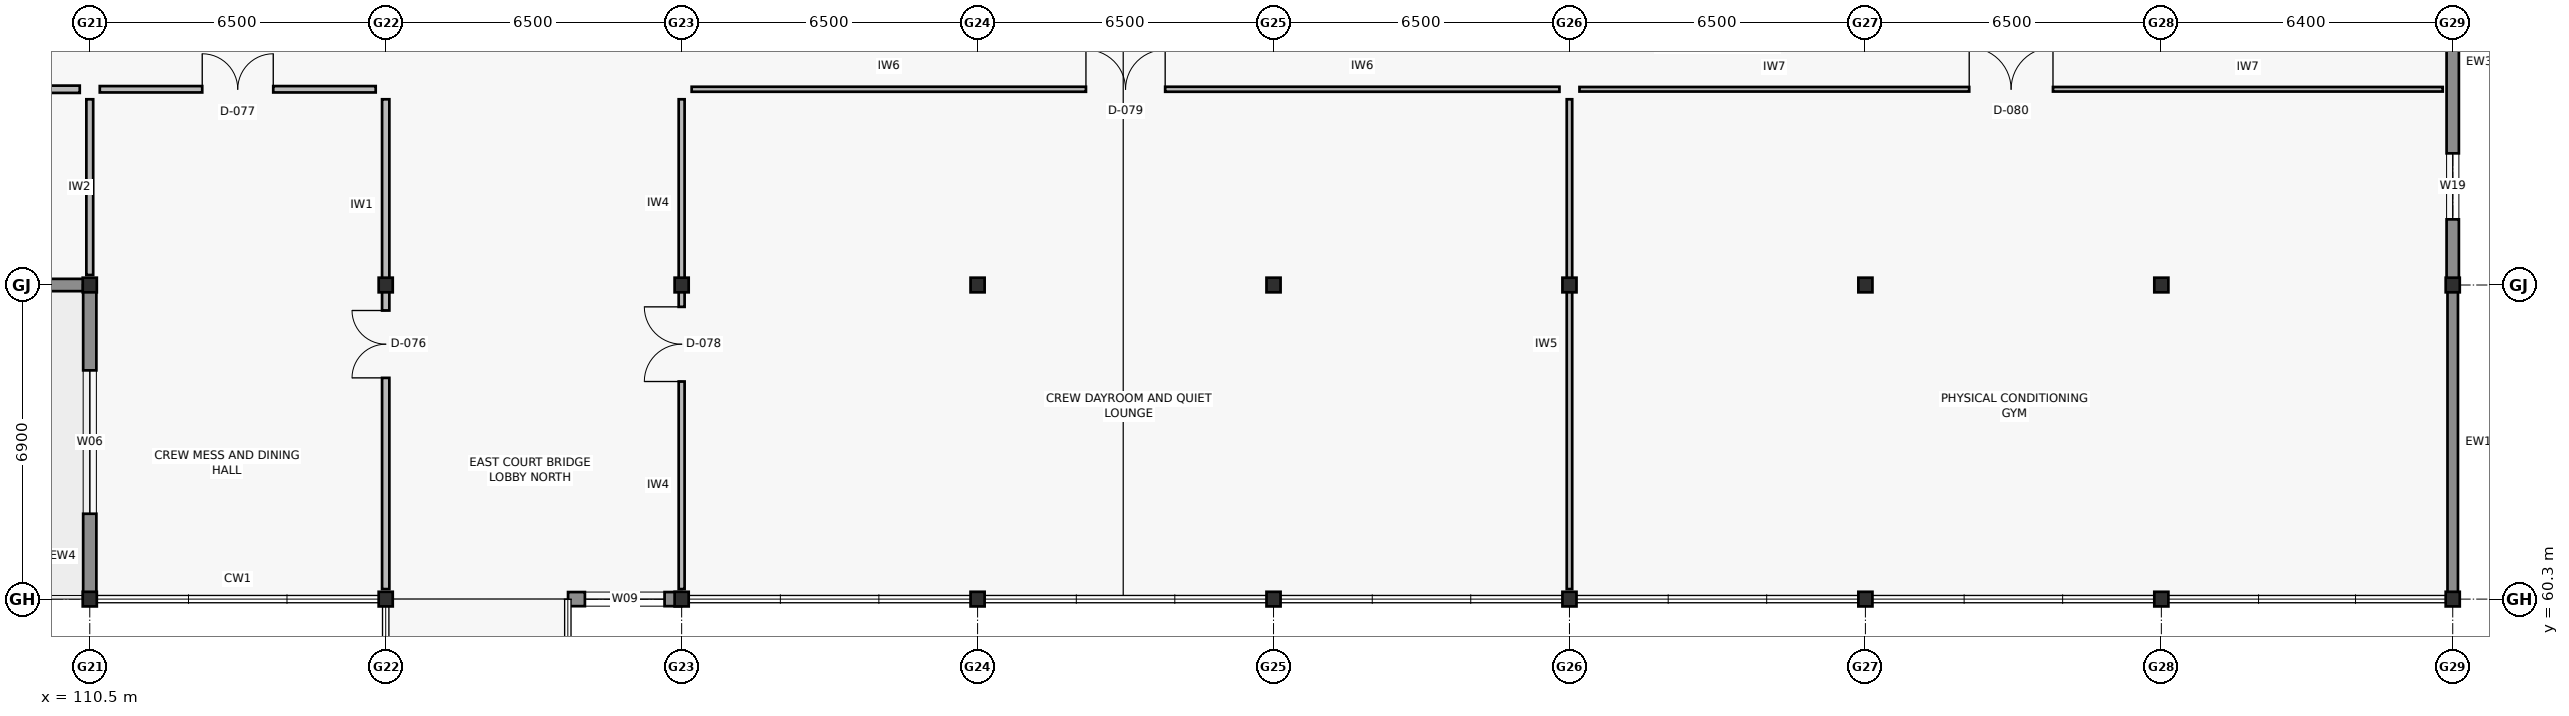
"""IFC4 building model, lengths in metres.
Left out: names, types, materials, properties, quantities, classifications, styles, units other than length and angle.
Written with IfcOpenShell. Run it as: python <this file> out.ifc"""

import sys

from ifc_helpers import new_model, si_unit, direction, frame, frame_2d, origin, origin_2d, place, context, subcontext, project, spatial, rectangle, i_section, extrude, element, fill, save


model = new_model("IFC4")
c1 = context("Model", 3, precision=1e-05, world=origin(), true_north=direction((0.0, 1.0)))
c2 = subcontext(c1, "Body", "Model", "MODEL_VIEW")
j1 = project(units=[si_unit("LENGTHUNIT", "METRE"), si_unit("PLANEANGLEUNIT", "RADIAN")], contexts=[c1])
p1 = place(None, origin())
s1 = spatial("IfcSite", under=j1, at=p1, CompositionType="ELEMENT")
p2 = place(p1, origin())
s2 = spatial("IfcBuilding", under=s1, at=p2, CompositionType="ELEMENT")
p3 = place(p2, frame((0.0, 0.0, 5.4)))
s3 = spatial("IfcBuildingStorey", under=s2, at=p3, CompositionType="ELEMENT", Elevation=5.4)
for number, where, z_axis, x_axis in (
    (1, (110.5, 60.3, 0.0), (0.0, 0.0, 1.0), (1.0, 0.0, 0.0)),
    (2, (110.5, 67.2, 0.0), (0.0, 0.0, 1.0), (1.0, 0.0, 0.0)),
    (3, (117.0, 60.3, 0.0), (0.0, 0.0, 1.0), (1.0, 0.0, 0.0)),
    (4, (117.0, 67.2, 0.0), (0.0, 0.0, 1.0), (1.0, 0.0, 0.0)),
    (5, (123.5, 60.3, 0.0), (0.0, 0.0, 1.0), (1.0, 0.0, 0.0)),
    (6, (123.5, 67.2, 0.0), (0.0, 0.0, 1.0), (1.0, 0.0, 0.0)),
    (7, (130.0, 60.3, 0.0), (0.0, 0.0, 1.0), (1.0, 0.0, 0.0)),
    (8, (130.0, 67.2, 0.0), (0.0, 0.0, 1.0), (1.0, 0.0, 0.0)),
    (9, (136.5, 60.3, 0.0), (0.0, 0.0, 1.0), (1.0, 0.0, 0.0)),
    (10, (136.5, 67.2, 0.0), (0.0, 0.0, 1.0), (1.0, 0.0, 0.0)),
    (11, (143.0, 60.3, 0.0), (0.0, 0.0, 1.0), (1.0, 0.0, 0.0)),
    (12, (143.0, 67.2, 0.0), (0.0, 0.0, 1.0), (1.0, 0.0, 0.0)),
    (13, (149.5, 60.3, 0.0), (0.0, 0.0, 1.0), (1.0, 0.0, 0.0)),
    (14, (149.5, 67.2, 0.0), (0.0, 0.0, 1.0), (1.0, 0.0, 0.0)),
    (15, (156.0, 60.3, 0.0), (0.0, 0.0, 1.0), (1.0, 0.0, 0.0)),
    (16, (156.0, 67.2, 0.0), (0.0, 0.0, 1.0), (1.0, 0.0, 0.0)),
    (17, (162.4, 60.3, 0.0), (0.0, 0.0, 1.0), (1.0, 0.0, 0.0)),
    (18, (162.4, 67.2, 0.0), (0.0, 0.0, 1.0), (1.0, 0.0, 0.0)),
):
    element("IfcColumn", number, at=place(p3, frame(where, z_axis=z_axis, x_axis=x_axis)), inside=s3, PredefinedType="COLUMN", context=c2, shape_type="SweptSolid", body=[
        extrude(i_section(OverallWidth=0.309, OverallDepth=0.321, WebThickness=0.014, FlangeThickness=0.022, FilletRadius=0.017, at=origin_2d()), origin(), (0.0, 0.0, 1.0), 4.2),
    ])
p4 = place(p3, frame((110.495, 67.2, 0.0), z_axis=(0.0, 0.0, 1.0), x_axis=(-1.0, 0.0, 0.0)))
e19 = element("IfcWall", 19, at=p4, inside=s3, PredefinedType="SOLIDWALL", context=c2, shape_type="SweptSolid", body=[
    extrude(rectangle(XDim=6.49, YDim=0.27, at=frame_2d((3.245, 0.0))), origin(), (0.0, 0.0, 1.0), 3.32),
])
p5 = place(p4, frame((2.675, 0.0, 0.0)))
e20 = element("IfcOpeningElement", 20, at=p5, cuts=e19, PredefinedType="OPENING", context=c2, shape_type="SweptSolid", body=[
    extrude(rectangle(XDim=1.14, YDim=2.14, at=frame_2d((0.57, 1.07))), frame((0.0, 0.145, 0.0), z_axis=(0.0, -1.0, 0.0), x_axis=(1.0, 0.0, 0.0)), (0.0, 0.0, 1.0), 0.29),
])
p6 = place(p3, frame((110.5, 60.305, 0.0), z_axis=(0.0, 0.0, 1.0), x_axis=(0.0, 1.0, 0.0)))
e21 = element("IfcWall", 21, at=p6, inside=s3, PredefinedType="SOLIDWALL", context=c2, shape_type="SweptSolid", body=[
    extrude(rectangle(XDim=6.89, YDim=0.29, at=frame_2d((3.445, 0.0))), origin(), (0.0, 0.0, 1.0), 3.32),
])
p7 = place(p6, frame((1.87, 0.0, 0.8)))
e22 = element("IfcOpeningElement", 22, at=p7, cuts=e21, PredefinedType="OPENING", context=c2, shape_type="SweptSolid", body=[
    extrude(rectangle(XDim=3.15, YDim=2.1, at=frame_2d((1.575, 1.05))), frame((0.0, 0.155, 0.0), z_axis=(0.0, -1.0, 0.0), x_axis=(1.0, 0.0, 0.0)), (0.0, 0.0, 1.0), 0.31),
])
p8 = place(p3, frame((123.495, 60.3, 0.0), z_axis=(0.0, 0.0, 1.0), x_axis=(-1.0, 0.0, 0.0)))
e23 = element("IfcWall", 23, at=p8, inside=s3, PredefinedType="SOLIDWALL", context=c2, shape_type="SweptSolid", body=[
    extrude(rectangle(XDim=2.49, YDim=0.31, at=frame_2d((1.245, 0.0))), origin(), (0.0, 0.0, 1.0), 3.32),
])
p9 = place(p8, frame((0.37, 0.0, 0.8)))
e24 = element("IfcOpeningElement", 24, at=p9, cuts=e23, PredefinedType="OPENING", context=c2, shape_type="SweptSolid", body=[
    extrude(rectangle(XDim=1.75, YDim=1.8, at=frame_2d((0.875, 0.9))), frame((0.0, 0.165, 0.0), z_axis=(0.0, -1.0, 0.0), x_axis=(1.0, 0.0, 0.0)), (0.0, 0.0, 1.0), 0.33),
])
p10 = place(p3, frame((162.4, 67.195, 0.0), z_axis=(0.0, 0.0, 1.0), x_axis=(0.0, -1.0, 0.0)))
e25 = element("IfcWall", 25, at=p10, inside=s3, PredefinedType="SOLIDWALL", context=c2, shape_type="SweptSolid", body=[
    extrude(rectangle(XDim=6.89, YDim=0.23, at=frame_2d((3.445, 0.0))), origin(), (0.0, 0.0, 1.0), 3.32),
])
p11 = place(p3, frame((162.4, 74.095, 0.0), z_axis=(0.0, 0.0, 1.0), x_axis=(0.0, -1.0, 0.0)))
e26 = element("IfcWall", 26, at=p11, inside=s3, PredefinedType="SOLIDWALL", context=c2, shape_type="SweptSolid", body=[
    extrude(rectangle(XDim=6.89, YDim=0.27, at=frame_2d((3.445, 0.0))), origin(), (0.0, 0.0, 1.0), 3.32),
])
p12 = place(p11, frame((4.002, 0.0, 0.8)))
e27 = element("IfcOpeningElement", 27, at=p12, cuts=e26, PredefinedType="OPENING", context=c2, shape_type="SweptSolid", body=[
    extrude(rectangle(XDim=1.45, YDim=1.8, at=frame_2d((0.725, 0.9))), frame((0.0, 0.145, 0.0), z_axis=(0.0, -1.0, 0.0), x_axis=(1.0, 0.0, 0.0)), (0.0, 0.0, 1.0), 0.29),
])
p13 = place(p3, frame((117.0, 60.52, 0.0), z_axis=(0.0, 0.0, 1.0), x_axis=(0.0, 1.0, 0.0)))
e28 = element("IfcWall", 28, at=p13, inside=s3, PredefinedType="PARTITIONING", context=c2, shape_type="SweptSolid", body=[
    extrude(rectangle(XDim=10.76, YDim=0.16, at=frame_2d((5.38, 0.0))), origin(), (0.0, 0.0, 1.0), 3.3),
])
p14 = place(p13, frame((4.64, 0.0, 0.0)))
e29 = element("IfcOpeningElement", 29, at=p14, cuts=e28, PredefinedType="OPENING", context=c2, shape_type="SweptSolid", body=[
    extrude(rectangle(XDim=1.48, YDim=2.18, at=frame_2d((0.74, 1.09))), frame((0.0, 0.09, 0.0), z_axis=(0.0, -1.0, 0.0), x_axis=(1.0, 0.0, 0.0)), (0.0, 0.0, 1.0), 0.18),
])
p15 = place(p3, frame((110.5, 67.42, 0.0), z_axis=(0.0, 0.0, 1.0), x_axis=(0.0, 1.0, 0.0)))
e30 = element("IfcWall", 30, at=p15, inside=s3, PredefinedType="PARTITIONING", context=c2, shape_type="SweptSolid", body=[
    extrude(rectangle(XDim=3.86, YDim=0.15, at=frame_2d((1.93, 0.0))), origin(), (0.0, 0.0, 1.0), 3.3),
])
p16 = place(p3, frame((110.72, 71.5, 0.0), z_axis=(0.0, 0.0, 1.0), x_axis=(1.0, 0.0, 0.0)))
e31 = element("IfcWall", 31, at=p16, inside=s3, PredefinedType="PARTITIONING", context=c2, shape_type="SweptSolid", body=[
    extrude(rectangle(XDim=6.06, YDim=0.14, at=frame_2d((3.03, 0.0))), origin(), (0.0, 0.0, 1.0), 3.3),
])
p17 = place(p16, frame((2.25, 0.0, 0.0)))
e32 = element("IfcOpeningElement", 32, at=p17, cuts=e31, PredefinedType="OPENING", context=c2, shape_type="SweptSolid", body=[
    extrude(rectangle(XDim=1.56, YDim=2.18, at=frame_2d((0.78, 1.09))), frame((0.0, 0.08, 0.0), z_axis=(0.0, -1.0, 0.0), x_axis=(1.0, 0.0, 0.0)), (0.0, 0.0, 1.0), 0.16),
])
p18 = place(p3, frame((123.5, 60.52, 0.0), z_axis=(0.0, 0.0, 1.0), x_axis=(0.0, 1.0, 0.0)))
e33 = element("IfcWall", 33, at=p18, inside=s3, PredefinedType="PARTITIONING", context=c2, shape_type="SweptSolid", body=[
    extrude(rectangle(XDim=10.76, YDim=0.13, at=frame_2d((5.38, 0.0))), origin(), (0.0, 0.0, 1.0), 3.3),
])
p19 = place(p18, frame((4.56, 0.0, 0.0)))
e34 = element("IfcOpeningElement", 34, at=p19, cuts=e33, PredefinedType="OPENING", context=c2, shape_type="SweptSolid", body=[
    extrude(rectangle(XDim=1.64, YDim=2.2, at=frame_2d((0.82, 1.1))), frame((0.0, 0.075, 0.0), z_axis=(0.0, -1.0, 0.0), x_axis=(1.0, 0.0, 0.0)), (0.0, 0.0, 1.0), 0.15),
])
p20 = place(p3, frame((143.0, 60.52, 0.0), z_axis=(0.0, 0.0, 1.0), x_axis=(0.0, 1.0, 0.0)))
e35 = element("IfcWall", 35, at=p20, inside=s3, PredefinedType="PARTITIONING", context=c2, shape_type="SweptSolid", body=[
    extrude(rectangle(XDim=10.76, YDim=0.12, at=frame_2d((5.38, 0.0))), origin(), (0.0, 0.0, 1.0), 3.3),
])
p21 = place(p3, frame((123.72, 71.5, 0.0), z_axis=(0.0, 0.0, 1.0), x_axis=(1.0, 0.0, 0.0)))
e36 = element("IfcWall", 36, at=p21, inside=s3, PredefinedType="PARTITIONING", context=c2, shape_type="SweptSolid", body=[
    extrude(rectangle(XDim=19.06, YDim=0.11, at=frame_2d((9.53, 0.0))), origin(), (0.0, 0.0, 1.0), 3.3),
])
p22 = place(p21, frame((8.66, 0.0, 0.0)))
e37 = element("IfcOpeningElement", 37, at=p22, cuts=e36, PredefinedType="OPENING", context=c2, shape_type="SweptSolid", body=[
    extrude(rectangle(XDim=1.74, YDim=2.2, at=frame_2d((0.87, 1.1))), frame((0.0, 0.065, 0.0), z_axis=(0.0, -1.0, 0.0), x_axis=(1.0, 0.0, 0.0)), (0.0, 0.0, 1.0), 0.13),
])
p23 = place(p3, frame((143.22, 71.5, 0.0), z_axis=(0.0, 0.0, 1.0), x_axis=(1.0, 0.0, 0.0)))
e38 = element("IfcWall", 38, at=p23, inside=s3, PredefinedType="PARTITIONING", context=c2, shape_type="SweptSolid", body=[
    extrude(rectangle(XDim=18.96, YDim=0.1, at=frame_2d((9.48, 0.0))), origin(), (0.0, 0.0, 1.0), 3.3),
])
p24 = place(p23, frame((8.56, 0.0, 0.0)))
e39 = element("IfcOpeningElement", 39, at=p24, cuts=e38, PredefinedType="OPENING", context=c2, shape_type="SweptSolid", body=[
    extrude(rectangle(XDim=1.84, YDim=2.22, at=frame_2d((0.92, 1.11))), frame((0.0, 0.06, 0.0), z_axis=(0.0, -1.0, 0.0), x_axis=(1.0, 0.0, 0.0)), (0.0, 0.0, 1.0), 0.12),
])
p25 = place(p3, frame((104.22, 71.5, 0.0), z_axis=(0.0, 0.0, 1.0), x_axis=(1.0, 0.0, 0.0)))
e40 = element("IfcWall", 40, at=p25, inside=s3, PredefinedType="PARTITIONING", context=c2, shape_type="SweptSolid", body=[
    extrude(rectangle(XDim=6.06, YDim=0.16, at=frame_2d((3.03, 0.0))), origin(), (0.0, 0.0, 1.0), 3.3),
])
p26 = place(p25, frame((2.59, 0.0, 0.0)))
e41 = element("IfcOpeningElement", 41, at=p26, cuts=e40, PredefinedType="OPENING", context=c2, shape_type="SweptSolid", body=[
    extrude(rectangle(XDim=0.88, YDim=2.04, at=frame_2d((0.44, 1.02))), frame((0.0, 0.09, 0.0), z_axis=(0.0, -1.0, 0.0), x_axis=(1.0, 0.0, 0.0)), (0.0, 0.0, 1.0), 0.18),
])
p27 = place(p7, origin())
e42 = element("IfcWindow", 42, at=p27, inside=s3, PartitioningType="TRIPLE_PANEL_VERTICAL", PredefinedType="WINDOW", context=c2, shape_type="SweptSolid", body=[
    extrude(rectangle(XDim=3.15, YDim=2.1, at=frame_2d((1.575, 1.05))), frame((0.0, 0.03, 0.0), z_axis=(0.0, -1.0, 0.0), x_axis=(1.0, 0.0, 0.0)), (0.0, 0.0, 1.0), 0.06),
])
fill(e22, e42)
p28 = place(p9, origin())
e43 = element("IfcWindow", 43, at=p28, inside=s3, PartitioningType="DOUBLE_PANEL_VERTICAL", PredefinedType="WINDOW", context=c2, shape_type="SweptSolid", body=[
    extrude(rectangle(XDim=1.75, YDim=1.8, at=frame_2d((0.875, 0.9))), frame((0.0, 0.03, 0.0), z_axis=(0.0, -1.0, 0.0), x_axis=(1.0, 0.0, 0.0)), (0.0, 0.0, 1.0), 0.06),
])
fill(e24, e43)
p29 = place(p12, origin())
e44 = element("IfcWindow", 44, at=p29, inside=s3, PartitioningType="SINGLE_PANEL", PredefinedType="WINDOW", context=c2, shape_type="SweptSolid", body=[
    extrude(rectangle(XDim=1.45, YDim=1.8, at=frame_2d((0.725, 0.9))), frame((0.0, 0.03, 0.0), z_axis=(0.0, -1.0, 0.0), x_axis=(1.0, 0.0, 0.0)), (0.0, 0.0, 1.0), 0.06),
])
fill(e27, e44)
p30 = place(p14, origin())
e45 = element("IfcDoor", 45, at=p30, inside=s3, OperationType="DOUBLE_DOOR_SINGLE_SWING", PredefinedType="DOOR", context=c2, shape_type="SweptSolid", body=[
    extrude(rectangle(XDim=1.48, YDim=2.18, at=frame_2d((0.74, 1.09))), frame((0.0, 0.025, 0.0), z_axis=(0.0, -1.0, 0.0), x_axis=(1.0, 0.0, 0.0)), (0.0, 0.0, 1.0), 0.05),
])
fill(e29, e45)
p31 = place(p17, origin())
e46 = element("IfcDoor", 46, at=p31, inside=s3, OperationType="DOUBLE_DOOR_SINGLE_SWING", PredefinedType="DOOR", context=c2, shape_type="SweptSolid", body=[
    extrude(rectangle(XDim=1.56, YDim=2.18, at=frame_2d((0.78, 1.09))), frame((0.0, 0.025, 0.0), z_axis=(0.0, -1.0, 0.0), x_axis=(1.0, 0.0, 0.0)), (0.0, 0.0, 1.0), 0.05),
])
fill(e32, e46)
p32 = place(p19, origin())
e47 = element("IfcDoor", 47, at=p32, inside=s3, OperationType="DOUBLE_DOOR_SINGLE_SWING", PredefinedType="DOOR", context=c2, shape_type="SweptSolid", body=[
    extrude(rectangle(XDim=1.64, YDim=2.2, at=frame_2d((0.82, 1.1))), frame((0.0, 0.025, 0.0), z_axis=(0.0, -1.0, 0.0), x_axis=(1.0, 0.0, 0.0)), (0.0, 0.0, 1.0), 0.05),
])
fill(e34, e47)
p33 = place(p22, origin())
e48 = element("IfcDoor", 48, at=p33, inside=s3, OperationType="DOUBLE_DOOR_SINGLE_SWING", PredefinedType="DOOR", context=c2, shape_type="SweptSolid", body=[
    extrude(rectangle(XDim=1.74, YDim=2.2, at=frame_2d((0.87, 1.1))), frame((0.0, 0.025, 0.0), z_axis=(0.0, -1.0, 0.0), x_axis=(1.0, 0.0, 0.0)), (0.0, 0.0, 1.0), 0.05),
])
fill(e37, e48)
p34 = place(p24, origin())
e49 = element("IfcDoor", 49, at=p34, inside=s3, OperationType="DOUBLE_DOOR_SINGLE_SWING", PredefinedType="DOOR", context=c2, shape_type="SweptSolid", body=[
    extrude(rectangle(XDim=1.84, YDim=2.22, at=frame_2d((0.92, 1.11))), frame((0.0, 0.025, 0.0), z_axis=(0.0, -1.0, 0.0), x_axis=(1.0, 0.0, 0.0)), (0.0, 0.0, 1.0), 0.05),
])
fill(e39, e49)
save(model, sys.argv[1])
